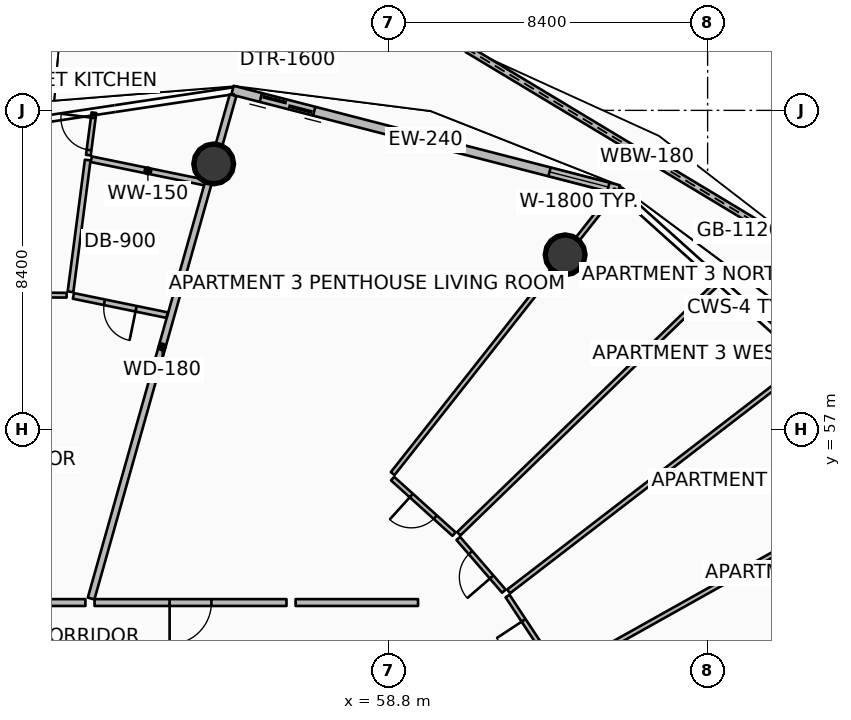
"""IFC4 building model, lengths in metres.
Left out: names, types, materials, properties, quantities, classifications, styles, units other than length and angle.
Written with IfcOpenShell. Run it as: python <this file> out.ifc"""

import sys

from ifc_helpers import new_model, si_unit, direction, frame, frame_2d, origin, origin_2d, place, context, subcontext, project, spatial, polyline, rectangle, circle, outline, extrude, element, fill, save


model = new_model("IFC4")
c1 = context("Model", 3, precision=1e-05, world=origin(), true_north=direction((0.0, 1.0)))
c2 = subcontext(c1, "Body", "Model", "MODEL_VIEW")
j1 = project(units=[si_unit("LENGTHUNIT", "METRE"), si_unit("PLANEANGLEUNIT", "RADIAN")], contexts=[c1])
p1 = place(None, origin())
s1 = spatial("IfcSite", under=j1, at=p1, CompositionType="ELEMENT")
p2 = place(p1, origin())
s2 = spatial("IfcBuilding", under=s1, at=p2, CompositionType="ELEMENT")
p3 = place(p2, frame((0.0, 0.0, 184.05)))
s3 = spatial("IfcBuildingStorey", under=s2, at=p3, CompositionType="ELEMENT", Elevation=184.05)
for number, where, z_axis, x_axis in (
    (1, (63.451, 61.599, 0.0), (0.0, 0.0, 1.0), (1.0, 0.0, 0.0)),
    (2, (54.202, 63.992, 0.0), (0.0, 0.0, 1.0), (1.0, 0.0, 0.0)),
):
    element("IfcColumn", number, at=place(p3, frame(where, z_axis=z_axis, x_axis=x_axis)), inside=s3, PredefinedType="COLUMN", context=c2, shape_type="SweptSolid", body=[
        extrude(circle(Radius=0.525, at=origin_2d()), origin(), (0.0, 0.0, 1.0), 3.5),
    ])
p4 = place(p3, frame((70.34, 61.317, 0.0), z_axis=(0.0, 0.0, 1.0), x_axis=(-0.856758582714, 0.515717685314, 0.0)))
e3 = element("IfcWall", 3, at=p4, inside=s3, PredefinedType="PARAPET", context=c2, shape_type="SweptSolid", body=[
    extrude(outline(polyline([(0.0, 0.0), (11.043, 0.0), (11.043, 1.348), (5.521, 1.182), (0.0, 1.12), (0.0, 0.0)])), frame((0.0, 0.09, 0.0), z_axis=(0.0, -1.0, 0.0), x_axis=(1.0, 0.0, 0.0)), (0.0, 0.0, 1.0), 0.18),
])
p5 = place(p3, frame((64.86, 63.313, 0.0), z_axis=(0.0, 0.0, 1.0), x_axis=(-0.968374028006, 0.249502989727, 0.0)))
e4 = element("IfcWall", 4, at=p5, inside=s3, PredefinedType="SOLIDWALL", context=c2, shape_type="SweptSolid", body=[
    extrude(rectangle(XDim=10.494, YDim=0.24, at=frame_2d((5.247, 0.0))), origin(), (0.0, 0.0, 1.0), 2.45),
])
p6 = place(p5, frame((8.274, 0.0, 0.0)))
e5 = element("IfcOpeningElement", 5, at=p6, cuts=e4, PredefinedType="OPENING", context=c2, shape_type="SweptSolid", body=[
    extrude(rectangle(XDim=1.45, YDim=2.15, at=frame_2d((0.725, 1.075))), frame((0.0, 0.13, 0.0), z_axis=(0.0, -1.0, 0.0), x_axis=(1.0, 0.0, 0.0)), (0.0, 0.0, 1.0), 0.26),
])
p7 = place(p5, frame((0.28, 0.0, 0.65)))
e6 = element("IfcOpeningElement", 6, at=p7, cuts=e4, PredefinedType="OPENING", context=c2, shape_type="SweptSolid", body=[
    extrude(rectangle(XDim=1.6, YDim=1.5, at=frame_2d((0.8, 0.75))), frame((0.0, 0.13, 0.0), z_axis=(0.0, -1.0, 0.0), x_axis=(1.0, 0.0, 0.0)), (0.0, 0.0, 1.0), 0.26),
])
p8 = place(p3, frame((50.977, 52.556, 0.0), z_axis=(0.0, 0.0, 1.0), x_axis=(0.271443307373, 0.962454430548, 0.0)))
e7 = element("IfcWall", 7, at=p8, inside=s3, PredefinedType="PARTITIONING", context=c2, shape_type="SweptSolid", body=[
    extrude(rectangle(XDim=13.759, YDim=0.18, at=frame_2d((6.88, 0.0))), origin(), (0.0, 0.0, 1.0), 2.94),
])
p9 = place(p3, frame((50.827, 52.45, 0.0), z_axis=(0.0, 0.0, 1.0), x_axis=(-1.0, 0.0, 0.0)))
e8 = element("IfcWall", 8, at=p9, inside=s3, PredefinedType="PARTITIONING", context=c2, shape_type="SweptSolid", body=[
    extrude(rectangle(XDim=3.944, YDim=0.18, at=frame_2d((1.972, 0.0))), origin(), (0.0, 0.0, 1.0), 2.94),
])
p10 = place(p3, frame((52.976, 60.012, 0.0), z_axis=(0.0, 0.0, 1.0), x_axis=(-0.979567919456, 0.201113627516, 0.0)))
e9 = element("IfcWall", 9, at=p10, inside=s3, PredefinedType="PARTITIONING", context=c2, shape_type="SweptSolid", body=[
    extrude(rectangle(XDim=2.517, YDim=0.15, at=frame_2d((1.258, 0.0))), origin(), (0.0, 0.0, 1.0), 2.94),
])
p11 = place(p10, frame((0.833, 0.0, 0.0)))
e10 = element("IfcOpeningElement", 10, at=p11, cuts=e9, PredefinedType="OPENING", context=c2, shape_type="SweptSolid", body=[
    extrude(rectangle(XDim=0.85, YDim=2.06, at=frame_2d((0.425, 1.03))), frame((0.0, 0.085, 0.0), z_axis=(0.0, -1.0, 0.0), x_axis=(1.0, 0.0, 0.0)), (0.0, 0.0, 1.0), 0.17),
])
p12 = place(p3, frame((53.961, 63.503, 0.0), z_axis=(0.0, 0.0, 1.0), x_axis=(-0.979589733131, 0.201007349976, 0.0)))
e11 = element("IfcWall", 11, at=p12, inside=s3, PredefinedType="PARTITIONING", context=c2, shape_type="SweptSolid", body=[
    extrude(rectangle(XDim=3.041, YDim=0.15, at=frame_2d((1.521, 0.0))), origin(), (0.0, 0.0, 1.0), 2.94),
])
p13 = place(p3, frame((50.435, 60.625, 0.0), z_axis=(0.0, 0.0, 1.0), x_axis=(0.129574965198, 0.991569628616, 0.0)))
e12 = element("IfcWall", 12, at=p13, inside=s3, PredefinedType="PARTITIONING", context=c2, shape_type="SweptSolid", body=[
    extrude(rectangle(XDim=3.497, YDim=0.15, at=frame_2d((1.749, 0.0))), origin(), (0.0, 0.0, 1.0), 2.94),
])
p14 = place(p3, frame((50.905, 64.222, 0.0), z_axis=(0.0, 0.0, 1.0), x_axis=(0.129607883109, 0.991565326459, 0.0)))
e13 = element("IfcWall", 13, at=p14, inside=s3, PredefinedType="PARTITIONING", context=c2, shape_type="SweptSolid", body=[
    extrude(rectangle(XDim=1.126, YDim=0.125, at=frame_2d((0.563, 0.0))), origin(), (0.0, 0.0, 1.0), 2.94),
])
p15 = place(p14, frame((0.138, 0.0, 0.0)))
e14 = element("IfcOpeningElement", 14, at=p15, cuts=e13, PredefinedType="OPENING", context=c2, shape_type="SweptSolid", body=[
    extrude(rectangle(XDim=0.85, YDim=2.06, at=frame_2d((0.425, 1.03))), frame((0.0, 0.073, 0.0), z_axis=(0.0, -1.0, 0.0), x_axis=(1.0, 0.0, 0.0)), (0.0, 0.0, 1.0), 0.145),
])
p16 = place(p3, frame((50.333, 60.537, 0.0), z_axis=(0.0, 0.0, 1.0), x_axis=(-0.999981626936, 0.006061830649, 0.0)))
e15 = element("IfcWall", 15, at=p16, inside=s3, PredefinedType="PARTITIONING", context=c2, shape_type="SweptSolid", body=[
    extrude(rectangle(XDim=4.43, YDim=0.125, at=frame_2d((2.215, 0.0))), origin(), (0.0, 0.0, 1.0), 2.94),
])
p17 = place(p16, frame((1.765, 0.0, 0.0)))
e16 = element("IfcOpeningElement", 16, at=p17, cuts=e15, PredefinedType="OPENING", context=c2, shape_type="SweptSolid", body=[
    extrude(rectangle(XDim=0.9, YDim=2.08, at=frame_2d((0.45, 1.04))), frame((0.0, 0.073, 0.0), z_axis=(0.0, -1.0, 0.0), x_axis=(1.0, 0.0, 0.0)), (0.0, 0.0, 1.0), 0.145),
])
p18 = place(p3, frame((56.118, 52.45, 0.0), z_axis=(0.0, 0.0, 1.0), x_axis=(-1.0, 0.0, 0.0)))
e17 = element("IfcWall", 17, at=p18, inside=s3, PredefinedType="PARTITIONING", context=c2, shape_type="SweptSolid", body=[
    extrude(rectangle(XDim=5.051, YDim=0.18, at=frame_2d((2.525, 0.0))), origin(), (0.0, 0.0, 1.0), 2.94),
])
p19 = place(p18, frame((1.975, 0.0, 0.0)))
e18 = element("IfcOpeningElement", 18, at=p19, cuts=e17, PredefinedType="OPENING", context=c2, shape_type="SweptSolid", body=[
    extrude(rectangle(XDim=1.1, YDim=2.1, at=frame_2d((0.55, 1.05))), frame((0.0, 0.1, 0.0), z_axis=(0.0, -1.0, 0.0), x_axis=(1.0, 0.0, 0.0)), (0.0, 0.0, 1.0), 0.2),
])
p20 = place(p3, frame((64.43, 48.356, 0.0), z_axis=(0.0, 0.0, 1.0), x_axis=(0.932640168577, 0.360807865709, 0.0)))
e19 = element("IfcWall", 19, at=p20, inside=s3, PredefinedType="PARTITIONING", context=c2, shape_type="SweptSolid", body=[
    extrude(rectangle(XDim=9.783, YDim=0.125, at=frame_2d((4.892, 0.0))), origin(), (0.0, 0.0, 1.0), 2.94),
])
p21 = place(p3, frame((59.58, 52.45, 0.0), z_axis=(0.0, 0.0, 1.0), x_axis=(-1.0, 0.0, 0.0)))
e20 = element("IfcWall", 20, at=p21, inside=s3, PredefinedType="PARTITIONING", context=c2, shape_type="SweptSolid", body=[
    extrude(rectangle(XDim=3.222, YDim=0.18, at=frame_2d((1.611, 0.0))), origin(), (0.0, 0.0, 1.0), 2.94),
])
p22 = place(p3, frame((63.379, 50.613, 0.0), z_axis=(0.0, 0.0, 1.0), x_axis=(0.872503583261, 0.488607712994, 0.0)))
e21 = element("IfcWall", 21, at=p22, inside=s3, PredefinedType="PARTITIONING", context=c2, shape_type="SweptSolid", body=[
    extrude(rectangle(XDim=10.268, YDim=0.125, at=frame_2d((5.134, 0.0))), origin(), (0.0, 0.0, 1.0), 2.94),
])
p23 = place(p3, frame((58.913, 55.843, 0.0), z_axis=(0.0, 0.0, 1.0), x_axis=(0.619083548323, 0.785325130246, 0.0)))
e22 = element("IfcWall", 22, at=p23, inside=s3, PredefinedType="PARTITIONING", context=c2, shape_type="SweptSolid", body=[
    extrude(rectangle(XDim=9.503, YDim=0.125, at=frame_2d((4.751, 0.0))), origin(), (0.0, 0.0, 1.0), 2.94),
])
p24 = place(p3, frame((61.962, 52.743, 0.0), z_axis=(0.0, 0.0, 1.0), x_axis=(0.792560870927, 0.609792805693, 0.0)))
e23 = element("IfcWall", 23, at=p24, inside=s3, PredefinedType="PARTITIONING", context=c2, shape_type="SweptSolid", body=[
    extrude(rectangle(XDim=9.922, YDim=0.125, at=frame_2d((4.961, 0.0))), origin(), (0.0, 0.0, 1.0), 2.94),
])
p25 = place(p3, frame((60.651, 54.26, 0.0), z_axis=(0.0, 0.0, 1.0), x_axis=(0.718131329051, 0.695907604669, 0.0)))
e24 = element("IfcWall", 24, at=p25, inside=s3, PredefinedType="PARTITIONING", context=c2, shape_type="SweptSolid", body=[
    extrude(rectangle(XDim=9.524, YDim=0.125, at=frame_2d((4.762, 0.0))), origin(), (0.0, 0.0, 1.0), 2.94),
])
p26 = place(p3, frame((63.248, 50.631, 0.0), z_axis=(0.0, 0.0, 1.0), x_axis=(-0.550605373428, 0.834765669366, 0.0)))
e25 = element("IfcWall", 25, at=p26, inside=s3, PredefinedType="PARTITIONING", context=c2, shape_type="SweptSolid", body=[
    extrude(rectangle(XDim=2.384, YDim=0.125, at=frame_2d((1.192, 0.0))), origin(), (0.0, 0.0, 1.0), 2.94),
])
p27 = place(p26, frame((0.767, 0.0, 0.0)))
e26 = element("IfcOpeningElement", 26, at=p27, cuts=e25, PredefinedType="OPENING", context=c2, shape_type="SweptSolid", body=[
    extrude(rectangle(XDim=0.85, YDim=2.06, at=frame_2d((0.425, 1.03))), frame((0.0, 0.073, 0.0), z_axis=(0.0, -1.0, 0.0), x_axis=(1.0, 0.0, 0.0)), (0.0, 0.0, 1.0), 0.145),
])
p28 = place(p3, frame((61.839, 52.749, 0.0), z_axis=(0.0, 0.0, 1.0), x_axis=(-0.653952359422, 0.756535730555, 0.0)))
e27 = element("IfcWall", 27, at=p28, inside=s3, PredefinedType="PARTITIONING", context=c2, shape_type="SweptSolid", body=[
    extrude(rectangle(XDim=1.835, YDim=0.125, at=frame_2d((0.917, 0.0))), origin(), (0.0, 0.0, 1.0), 2.94),
])
p29 = place(p28, frame((0.492, 0.0, 0.0)))
e28 = element("IfcOpeningElement", 28, at=p29, cuts=e27, PredefinedType="OPENING", context=c2, shape_type="SweptSolid", body=[
    extrude(rectangle(XDim=0.85, YDim=2.06, at=frame_2d((0.425, 1.03))), frame((0.0, 0.073, 0.0), z_axis=(0.0, -1.0, 0.0), x_axis=(1.0, 0.0, 0.0)), (0.0, 0.0, 1.0), 0.145),
])
p30 = place(p3, frame((60.527, 54.251, 0.0), z_axis=(0.0, 0.0, 1.0), x_axis=(-0.742223129556, 0.670152837755, 0.0)))
e29 = element("IfcWall", 29, at=p30, inside=s3, PredefinedType="PARTITIONING", context=c2, shape_type="SweptSolid", body=[
    extrude(rectangle(XDim=2.178, YDim=0.125, at=frame_2d((1.089, 0.0))), origin(), (0.0, 0.0, 1.0), 2.94),
])
p31 = place(p30, frame((0.664, 0.0, 0.0)))
e30 = element("IfcOpeningElement", 30, at=p31, cuts=e29, PredefinedType="OPENING", context=c2, shape_type="SweptSolid", body=[
    extrude(rectangle(XDim=0.85, YDim=2.06, at=frame_2d((0.425, 1.03))), frame((0.0, 0.073, 0.0), z_axis=(0.0, -1.0, 0.0), x_axis=(1.0, 0.0, 0.0)), (0.0, 0.0, 1.0), 0.145),
])
p32 = place(p6, origin())
e31 = element("IfcDoor", 31, at=p32, inside=s3, OperationType="DOUBLE_DOOR_SLIDING", PredefinedType="DOOR", context=c2, shape_type="SweptSolid", body=[
    extrude(rectangle(XDim=1.45, YDim=2.15, at=frame_2d((0.725, 1.075))), frame((0.0, 0.025, 0.0), z_axis=(0.0, -1.0, 0.0), x_axis=(1.0, 0.0, 0.0)), (0.0, 0.0, 1.0), 0.05),
])
fill(e5, e31)
p33 = place(p7, origin())
e32 = element("IfcWindow", 32, at=p33, inside=s3, PartitioningType="SINGLE_PANEL", PredefinedType="WINDOW", context=c2, shape_type="SweptSolid", body=[
    extrude(rectangle(XDim=1.6, YDim=1.5, at=frame_2d((0.8, 0.75))), frame((0.0, 0.03, 0.0), z_axis=(0.0, -1.0, 0.0), x_axis=(1.0, 0.0, 0.0)), (0.0, 0.0, 1.0), 0.06),
])
fill(e6, e32)
p34 = place(p11, origin())
e33 = element("IfcDoor", 33, at=p34, inside=s3, OperationType="SINGLE_SWING_LEFT", PredefinedType="DOOR", context=c2, shape_type="SweptSolid", body=[
    extrude(rectangle(XDim=0.85, YDim=2.06, at=frame_2d((0.425, 1.03))), frame((0.0, 0.025, 0.0), z_axis=(0.0, -1.0, 0.0), x_axis=(1.0, 0.0, 0.0)), (0.0, 0.0, 1.0), 0.05),
])
fill(e10, e33)
p35 = place(p15, origin())
e34 = element("IfcDoor", 34, at=p35, inside=s3, OperationType="SINGLE_SWING_RIGHT", PredefinedType="DOOR", context=c2, shape_type="SweptSolid", body=[
    extrude(rectangle(XDim=0.85, YDim=2.06, at=frame_2d((0.425, 1.03))), frame((0.0, 0.025, 0.0), z_axis=(0.0, -1.0, 0.0), x_axis=(1.0, 0.0, 0.0)), (0.0, 0.0, 1.0), 0.05),
])
fill(e14, e34)
p36 = place(p19, origin())
e35 = element("IfcDoor", 35, at=p36, inside=s3, OperationType="SINGLE_SWING_RIGHT", PredefinedType="DOOR", context=c2, shape_type="SweptSolid", body=[
    extrude(rectangle(XDim=1.1, YDim=2.1, at=frame_2d((0.55, 1.05))), frame((0.0, 0.025, 0.0), z_axis=(0.0, -1.0, 0.0), x_axis=(1.0, 0.0, 0.0)), (0.0, 0.0, 1.0), 0.05),
])
fill(e18, e35)
p37 = place(p27, origin())
e36 = element("IfcDoor", 36, at=p37, inside=s3, OperationType="SINGLE_SWING_RIGHT", PredefinedType="DOOR", context=c2, shape_type="SweptSolid", body=[
    extrude(rectangle(XDim=0.85, YDim=2.06, at=frame_2d((0.425, 1.03))), frame((0.0, 0.025, 0.0), z_axis=(0.0, -1.0, 0.0), x_axis=(1.0, 0.0, 0.0)), (0.0, 0.0, 1.0), 0.05),
])
fill(e26, e36)
p38 = place(p29, origin())
e37 = element("IfcDoor", 37, at=p38, inside=s3, OperationType="SINGLE_SWING_LEFT", PredefinedType="DOOR", context=c2, shape_type="SweptSolid", body=[
    extrude(rectangle(XDim=0.85, YDim=2.06, at=frame_2d((0.425, 1.03))), frame((0.0, 0.025, 0.0), z_axis=(0.0, -1.0, 0.0), x_axis=(1.0, 0.0, 0.0)), (0.0, 0.0, 1.0), 0.05),
])
fill(e28, e37)
p39 = place(p31, origin())
e38 = element("IfcDoor", 38, at=p39, inside=s3, OperationType="SINGLE_SWING_RIGHT", PredefinedType="DOOR", context=c2, shape_type="SweptSolid", body=[
    extrude(rectangle(XDim=0.85, YDim=2.06, at=frame_2d((0.425, 1.03))), frame((0.0, 0.025, 0.0), z_axis=(0.0, -1.0, 0.0), x_axis=(1.0, 0.0, 0.0)), (0.0, 0.0, 1.0), 0.05),
])
fill(e30, e38)
save(model, sys.argv[1])
